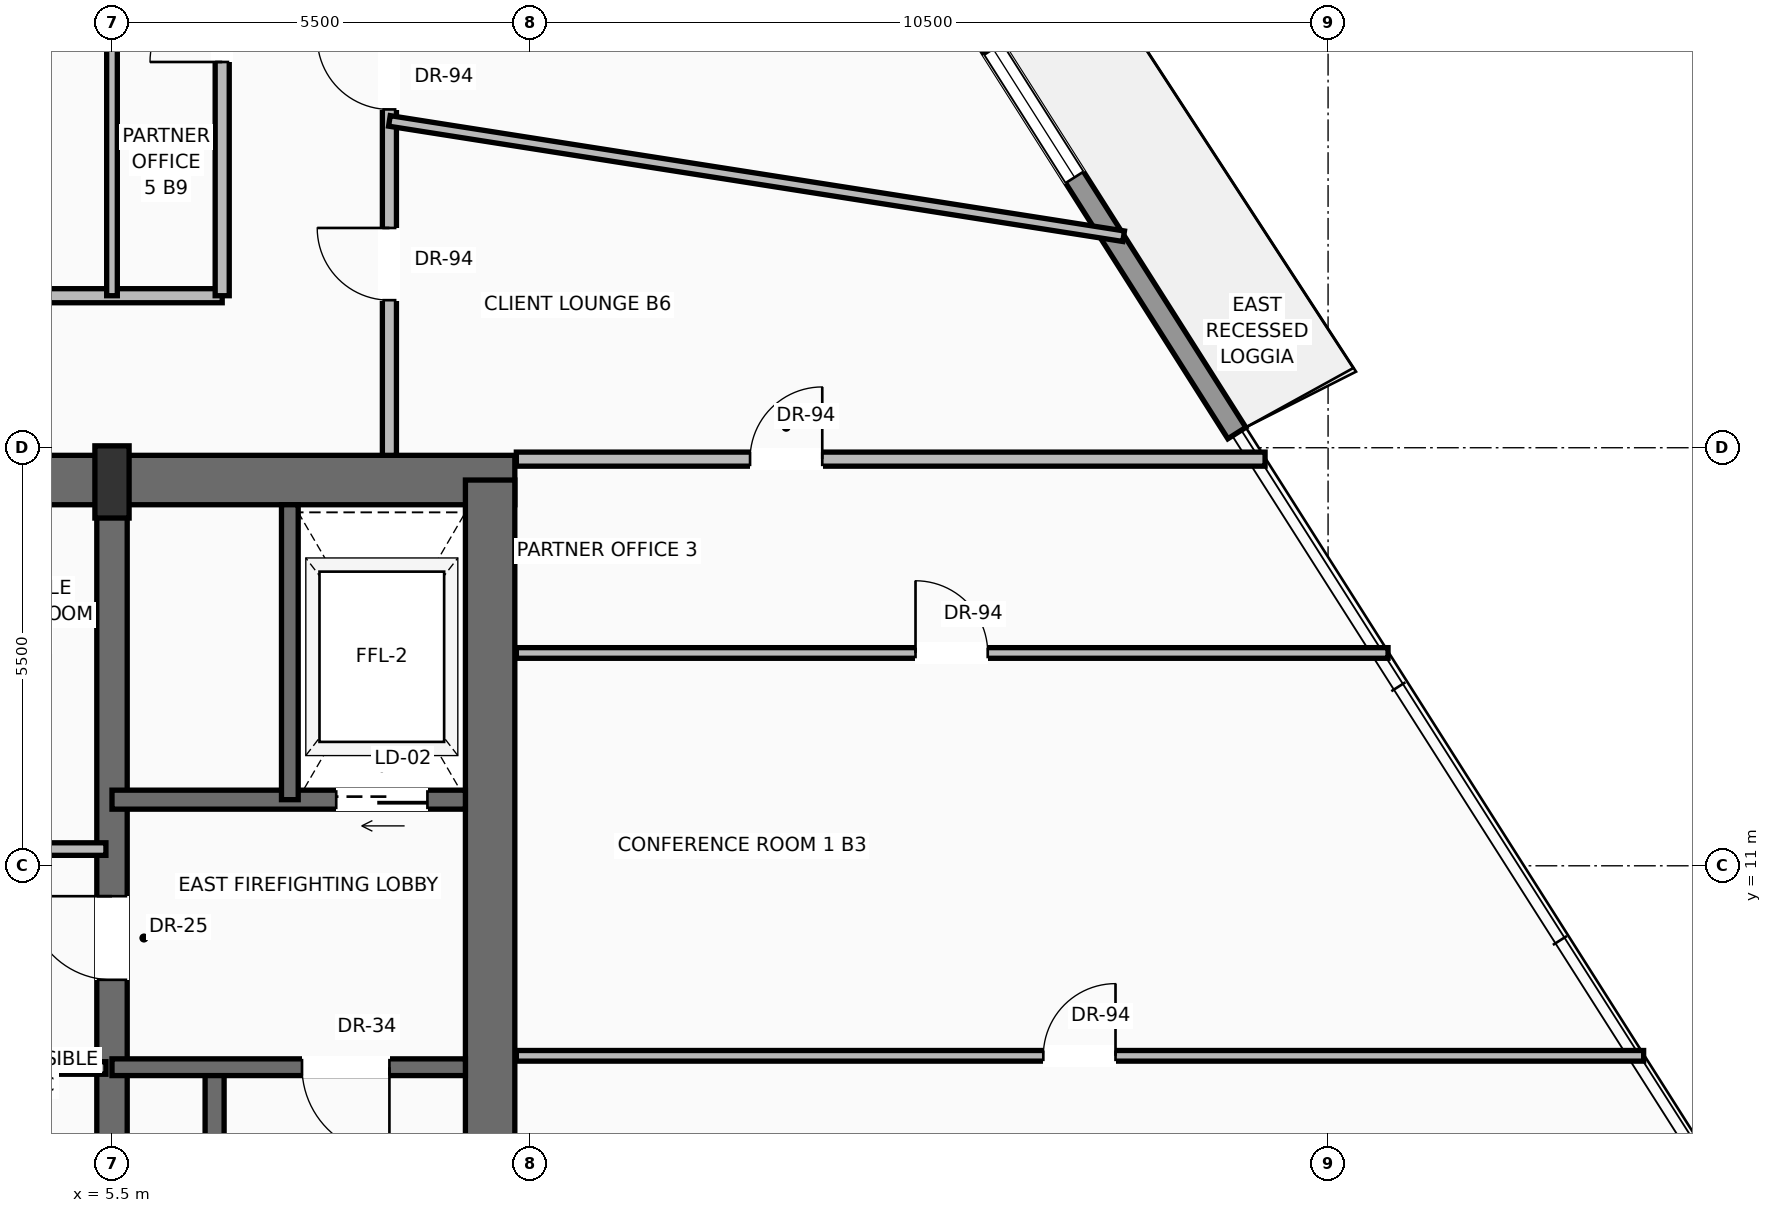
"""IFC4 building model, lengths in metres.
Left out: names, types, materials, properties, quantities, classifications, styles, units other than length and angle.
Written with IfcOpenShell. Run it as: python <this file> out.ifc"""

import sys

from ifc_helpers import new_model, si_unit, direction, frame, frame_2d, origin, origin_2d, place, context, subcontext, project, spatial, rectangle, extrude, source, transform, mapped, element, fill, save


model = new_model("IFC4")
c1 = context("Model", 3, precision=1e-05, world=origin(), true_north=direction((0.0, 1.0)))
c2 = subcontext(c1, "Body", "Model", "MODEL_VIEW")
j1 = project(units=[si_unit("LENGTHUNIT", "METRE"), si_unit("PLANEANGLEUNIT", "RADIAN")], contexts=[c1])
p1 = place(None, origin())
s1 = spatial("IfcSite", under=j1, at=p1, CompositionType="ELEMENT")
p2 = place(p1, origin())
s2 = spatial("IfcBuilding", under=s1, at=p2, CompositionType="ELEMENT")
p3 = place(p2, frame((0.0, 0.0, 174.7)))
s3 = spatial("IfcBuildingStorey", under=s2, at=p3, CompositionType="ELEMENT", Elevation=174.7)
p4 = place(p3, frame((-10.8, 16.075, 0.0), z_axis=(0.0, 0.0, 1.0), x_axis=(1.0, 0.0, 0.0)))
e1 = element("IfcWall", 1, at=p4, inside=s3, PredefinedType="SHEAR", context=c2, shape_type="SweptSolid", body=[
    extrude(rectangle(XDim=21.6, YDim=0.65, at=frame_2d((10.8, 0.0))), origin(), (0.0, 0.0, 1.0), 3.47),
])
p5 = place(p4, frame((3.37, 0.0, 0.0)))
e2 = element("IfcOpeningElement", 2, at=p5, cuts=e1, PredefinedType="OPENING", context=c2, shape_type="SweptSolid", body=[
    extrude(rectangle(XDim=1.3, YDim=2.3, at=frame_2d((0.65, 1.15))), frame((0.0, 0.335, 0.0), z_axis=(0.0, -1.0, 0.0), x_axis=(1.0, 0.0, 0.0)), (0.0, 0.0, 1.0), 0.67),
])
p6 = place(p4, frame((9.8, 0.0, 0.0)))
e3 = element("IfcOpeningElement", 3, at=p6, cuts=e1, PredefinedType="OPENING", context=c2, shape_type="SweptSolid", body=[
    extrude(rectangle(XDim=2.0, YDim=2.4, at=frame_2d((1.0, 1.2))), frame((0.0, 0.335, 0.0), z_axis=(0.0, -1.0, 0.0), x_axis=(1.0, 0.0, 0.0)), (0.0, 0.0, 1.0), 0.67),
])
p7 = place(p3, frame((10.475, 0.525, 0.0), z_axis=(0.0, 0.0, 1.0), x_axis=(0.0, 1.0, 0.0)))
e4 = element("IfcWall", 4, at=p7, inside=s3, PredefinedType="SHEAR", context=c2, shape_type="SweptSolid", body=[
    extrude(rectangle(XDim=15.55, YDim=0.65, at=frame_2d((7.775, 0.0))), origin(), (0.0, 0.0, 1.0), 3.47),
])
p8 = place(p3, frame((5.5, 0.525, 0.0), z_axis=(0.0, 0.0, 1.0), x_axis=(0.0, 1.0, 0.0)))
e5 = element("IfcWall", 5, at=p8, inside=s3, PredefinedType="SHEAR", context=c2, shape_type="SweptSolid", body=[
    extrude(rectangle(XDim=15.55, YDim=0.4, at=frame_2d((7.775, 0.0))), origin(), (0.0, 0.0, 1.0), 3.47),
])
p9 = place(p8, frame((8.975, 0.0, 0.0)))
e6 = element("IfcOpeningElement", 6, at=p9, cuts=e5, PredefinedType="OPENING", context=c2, shape_type="SweptSolid", body=[
    extrude(rectangle(XDim=1.1, YDim=2.2, at=frame_2d((0.55, 1.1))), frame((0.0, 0.21, 0.0), z_axis=(0.0, -1.0, 0.0), x_axis=(1.0, 0.0, 0.0)), (0.0, 0.0, 1.0), 0.42),
])
m1 = source(origin(), c2, "Body", "SweptSolid", [
    extrude(rectangle(XDim=0.45, YDim=0.95, at=origin_2d()), origin(), (0.0, 0.0, 1.0), 3.7),
])
p10 = place(p3, frame((5.5, 16.05, 0.0), z_axis=(0.0, 0.0, 1.0), x_axis=(1.0, 0.0, 0.0)))
e7 = element("IfcColumn", 7, at=p10, inside=s3, PredefinedType="PILASTER", context=c2, shape_type="MappedRepresentation", body=[
    mapped(m1, transform((0.0, 0.0, 0.0), scale=1.0)),
])
p11 = place(p3, frame((10.28, 32.484, 0.0), z_axis=(0.0, 0.0, 1.0), x_axis=(0.53575660665, -0.844372464278, 0.0)))
e8 = element("IfcWall", 8, at=p11, inside=s3, PredefinedType="SOLIDWALL", context=c2, shape_type="SweptSolid", body=[
    extrude(rectangle(XDim=18.701, YDim=0.28, at=frame_2d((9.351, 0.0))), origin(), (0.0, 0.0, 1.0), 3.05),
])
p12 = place(p11, frame((4.488, 0.0, 0.0)))
e9 = element("IfcOpeningElement", 9, at=p12, cuts=e8, PredefinedType="OPENING", context=c2, shape_type="SweptSolid", body=[
    extrude(rectangle(XDim=1.6, YDim=2.35, at=frame_2d((0.8, 1.175))), frame((0.0, 0.15, 0.0), z_axis=(0.0, -1.0, 0.0), x_axis=(1.0, 0.0, 0.0)), (0.0, 0.0, 1.0), 0.3),
])
p13 = place(p11, frame((12.717, 0.0, 0.9)))
e10 = element("IfcOpeningElement", 10, at=p13, cuts=e8, PredefinedType="OPENING", context=c2, shape_type="SweptSolid", body=[
    extrude(rectangle(XDim=2.0, YDim=1.85, at=frame_2d((1.0, 0.925))), frame((0.0, 0.15, 0.0), z_axis=(0.0, -1.0, 0.0), x_axis=(1.0, 0.0, 0.0)), (0.0, 0.0, 1.0), 0.3),
])
p14 = place(p3, frame((6.85, 0.85, 0.0), z_axis=(0.0, 0.0, 1.0), x_axis=(0.0, 1.0, 0.0)))
e11 = element("IfcWall", 11, at=p14, inside=s3, PredefinedType="SOLIDWALL", context=c2, shape_type="SweptSolid", body=[
    extrude(rectangle(XDim=7.5, YDim=0.25, at=frame_2d((3.75, 0.0))), origin(), (0.0, 0.0, 1.0), 3.47),
])
p15 = place(p3, frame((10.15, 8.35, 0.0), z_axis=(0.0, 0.0, 1.0), x_axis=(-1.0, 0.0, 0.0)))
e12 = element("IfcWall", 12, at=p15, inside=s3, PredefinedType="SOLIDWALL", context=c2, shape_type="SweptSolid", body=[
    extrude(rectangle(XDim=4.65, YDim=0.22, at=frame_2d((2.325, 0.0))), origin(), (0.0, 0.0, 1.0), 3.47),
])
p16 = place(p15, frame((1.0, 0.0, 0.0)))
e13 = element("IfcOpeningElement", 13, at=p16, cuts=e12, PredefinedType="OPENING", context=c2, shape_type="SweptSolid", body=[
    extrude(rectangle(XDim=1.15, YDim=2.2, at=frame_2d((0.575, 1.1))), frame((0.0, 0.12, 0.0), z_axis=(0.0, -1.0, 0.0), x_axis=(1.0, 0.0, 0.0)), (0.0, 0.0, 1.0), 0.24),
])
p17 = place(p3, frame((10.15, 11.87, 0.0), z_axis=(0.0, 0.0, 1.0), x_axis=(-1.0, 0.0, 0.0)))
e14 = element("IfcWall", 14, at=p17, inside=s3, PredefinedType="SOLIDWALL", context=c2, shape_type="SweptSolid", body=[
    extrude(rectangle(XDim=4.65, YDim=0.25, at=frame_2d((2.325, 0.0))), origin(), (0.0, 0.0, 1.0), 3.47),
])
p18 = place(p17, frame((0.5, 0.0, 0.0)))
e15 = element("IfcOpeningElement", 15, at=p18, cuts=e14, PredefinedType="OPENING", context=c2, shape_type="SweptSolid", body=[
    extrude(rectangle(XDim=1.2, YDim=2.25, at=frame_2d((0.6, 1.125))), frame((0.0, 0.135, 0.0), z_axis=(0.0, -1.0, 0.0), x_axis=(1.0, 0.0, 0.0)), (0.0, 0.0, 1.0), 0.27),
])
p19 = place(p3, frame((7.84, 11.87, 0.0), z_axis=(0.0, 0.0, 1.0), x_axis=(0.0, 1.0, 0.0)))
e16 = element("IfcWall", 16, at=p19, inside=s3, PredefinedType="SOLIDWALL", context=c2, shape_type="SweptSolid", body=[
    extrude(rectangle(XDim=3.88, YDim=0.22, at=frame_2d((1.94, 0.0))), origin(), (0.0, 0.0, 1.0), 3.47),
])
for number, where, z_axis, x_axis in (
    (17, (3.54, 8.34, 0.0), (0.0, 0.0, 1.0), (1.0, 0.0, 0.0)),
    (18, (3.54, 11.22, 0.0), (0.0, 0.0, 1.0), (1.0, 0.0, 0.0)),
):
    element("IfcWall", number, at=place(p3, frame(where, z_axis=z_axis, x_axis=x_axis)), inside=s3, PredefinedType="PARTITIONING", context=c2, shape_type="SweptSolid", body=[
        extrude(rectangle(XDim=1.88, YDim=0.165, at=frame_2d((0.94, 0.0))), origin(), (0.0, 0.0, 1.0), 3.462),
    ])
p20 = place(p3, frame((-7.25, 18.5, 0.0), z_axis=(0.0, 0.0, 1.0), x_axis=(1.0, 0.0, 0.0)))
e19 = element("IfcWall", 19, at=p20, inside=s3, PredefinedType="PARTITIONING", context=c2, shape_type="SweptSolid", body=[
    extrude(rectangle(XDim=14.2, YDim=0.185, at=frame_2d((7.1, 0.0))), origin(), (0.0, 0.0, 1.0), 2.846),
])
p21 = place(p20, frame((6.625, 0.0, 0.0)))
e20 = element("IfcOpeningElement", 20, at=p21, cuts=e19, PredefinedType="OPENING", context=c2, shape_type="SweptSolid", body=[
    extrude(rectangle(XDim=0.95, YDim=2.2, at=frame_2d((0.475, 1.1))), frame((0.0, 0.103, 0.0), z_axis=(0.0, -1.0, 0.0), x_axis=(1.0, 0.0, 0.0)), (0.0, 0.0, 1.0), 0.205),
])
p22 = place(p3, frame((6.95, 18.5, 0.0), z_axis=(0.0, 0.0, 1.0), x_axis=(0.0, 1.0, 0.0)))
e21 = element("IfcWall", 21, at=p22, inside=s3, PredefinedType="PARTITIONING", context=c2, shape_type="SweptSolid", body=[
    extrude(rectangle(XDim=7.1, YDim=0.185, at=frame_2d((3.55, 0.0))), origin(), (0.0, 0.0, 1.0), 2.846),
])
p23 = place(p22, frame((3.075, 0.0, 0.0)))
e22 = element("IfcOpeningElement", 22, at=p23, cuts=e21, PredefinedType="OPENING", context=c2, shape_type="SweptSolid", body=[
    extrude(rectangle(XDim=0.95, YDim=2.2, at=frame_2d((0.475, 1.1))), frame((0.0, 0.103, 0.0), z_axis=(0.0, -1.0, 0.0), x_axis=(1.0, 0.0, 0.0)), (0.0, 0.0, 1.0), 0.205),
])
p24 = place(p3, frame((9.15, 16.4, 0.0), z_axis=(0.0, 0.0, 1.0), x_axis=(0.0, 1.0, 0.0)))
e23 = element("IfcWall", 23, at=p24, inside=s3, PredefinedType="PARTITIONING", context=c2, shape_type="SweptSolid", body=[
    extrude(rectangle(XDim=9.2, YDim=0.185, at=frame_2d((4.6, 0.0))), origin(), (0.0, 0.0, 1.0), 2.846),
])
p25 = place(p24, frame((4.551, 0.0, 0.0)))
e24 = element("IfcOpeningElement", 24, at=p25, cuts=e23, PredefinedType="OPENING", context=c2, shape_type="SweptSolid", body=[
    extrude(rectangle(XDim=0.95, YDim=2.2, at=frame_2d((0.475, 1.1))), frame((0.0, 0.103, 0.0), z_axis=(0.0, -1.0, 0.0), x_axis=(1.0, 0.0, 0.0)), (0.0, 0.0, 1.0), 0.205),
])
p26 = place(p24, frame((2.042, 0.0, 0.0)))
e25 = element("IfcOpeningElement", 25, at=p26, cuts=e23, PredefinedType="OPENING", context=c2, shape_type="SweptSolid", body=[
    extrude(rectangle(XDim=0.95, YDim=2.2, at=frame_2d((0.475, 1.1))), frame((0.0, 0.103, 0.0), z_axis=(0.0, -1.0, 0.0), x_axis=(1.0, 0.0, 0.0)), (0.0, 0.0, 1.0), 0.205),
])
p27 = place(p3, frame((10.82, 16.35, 0.0), z_axis=(0.0, 0.0, 1.0), x_axis=(1.0, 0.0, 0.0)))
e26 = element("IfcWall", 26, at=p27, inside=s3, PredefinedType="PARTITIONING", context=c2, shape_type="SweptSolid", body=[
    extrude(rectangle(XDim=9.851, YDim=0.185, at=frame_2d((4.926, 0.0))), origin(), (0.0, 0.0, 1.0), 3.462),
])
p28 = place(p27, frame((3.075, 0.0, 0.0)))
e27 = element("IfcOpeningElement", 27, at=p28, cuts=e26, PredefinedType="OPENING", context=c2, shape_type="SweptSolid", body=[
    extrude(rectangle(XDim=0.95, YDim=2.2, at=frame_2d((0.475, 1.1))), frame((0.0, 0.103, 0.0), z_axis=(0.0, -1.0, 0.0), x_axis=(1.0, 0.0, 0.0)), (0.0, 0.0, 1.0), 0.205),
])
p29 = place(p3, frame((5.5, 18.5, 0.0), z_axis=(0.0, 0.0, 1.0), x_axis=(0.0, 1.0, 0.0)))
e28 = element("IfcWall", 28, at=p29, inside=s3, PredefinedType="PARTITIONING", context=c2, shape_type="SweptSolid", body=[
    extrude(rectangle(XDim=14.0, YDim=0.14, at=frame_2d((7.0, 0.0))), origin(), (0.0, 0.0, 1.0), 2.846),
])
p30 = place(p3, frame((10.82, 8.5, 0.0), z_axis=(0.0, 0.0, 1.0), x_axis=(1.0, 0.0, 0.0)))
e29 = element("IfcWall", 29, at=p30, inside=s3, PredefinedType="PARTITIONING", context=c2, shape_type="SweptSolid", body=[
    extrude(rectangle(XDim=14.832, YDim=0.14, at=frame_2d((7.416, 0.0))), origin(), (0.0, 0.0, 1.0), 3.462),
])
p31 = place(p30, frame((6.933, 0.0, 0.0)))
e30 = element("IfcOpeningElement", 30, at=p31, cuts=e29, PredefinedType="OPENING", context=c2, shape_type="SweptSolid", body=[
    extrude(rectangle(XDim=0.95, YDim=2.2, at=frame_2d((0.475, 1.1))), frame((0.0, 0.08, 0.0), z_axis=(0.0, -1.0, 0.0), x_axis=(1.0, 0.0, 0.0)), (0.0, 0.0, 1.0), 0.16),
])
p32 = place(p3, frame((10.82, 13.8, 0.0), z_axis=(0.0, 0.0, 1.0), x_axis=(1.0, 0.0, 0.0)))
e31 = element("IfcWall", 31, at=p32, inside=s3, PredefinedType="PARTITIONING", context=c2, shape_type="SweptSolid", body=[
    extrude(rectangle(XDim=11.469, YDim=0.14, at=frame_2d((5.734, 0.0))), origin(), (0.0, 0.0, 1.0), 3.462),
])
p33 = place(p32, frame((5.252, 0.0, 0.0)))
e32 = element("IfcOpeningElement", 32, at=p33, cuts=e31, PredefinedType="OPENING", context=c2, shape_type="SweptSolid", body=[
    extrude(rectangle(XDim=0.95, YDim=2.2, at=frame_2d((0.475, 1.1))), frame((0.0, 0.08, 0.0), z_axis=(0.0, -1.0, 0.0), x_axis=(1.0, 0.0, 0.0)), (0.0, 0.0, 1.0), 0.16),
])
p34 = place(p3, frame((9.15, 20.8, 0.0), z_axis=(0.0, 0.0, 1.0), x_axis=(0.987888554184, -0.155165087929, 0.0)))
e33 = element("IfcWall", 33, at=p34, inside=s3, PredefinedType="PARTITIONING", context=c2, shape_type="SweptSolid", body=[
    extrude(rectangle(XDim=9.779, YDim=0.14, at=frame_2d((4.889, 0.0))), origin(), (0.0, 0.0, 1.0), 3.049),
])
m2 = source(origin(), c2, "Body", "SweptSolid", [
    extrude(rectangle(XDim=2.0, YDim=1.85, at=frame_2d((1.0, 0.925))), frame((0.0, 0.03, 0.0), z_axis=(0.0, -1.0, 0.0), x_axis=(1.0, 0.0, 0.0)), (0.0, 0.0, 1.0), 0.06),
])
p35 = place(p13, origin())
e34 = element("IfcWindow", 34, at=p35, inside=s3, PartitioningType="SINGLE_PANEL", PredefinedType="WINDOW", context=c2, shape_type="MappedRepresentation", body=[
    mapped(m2, transform((0.0, 0.0, 0.0), scale=1.0)),
])
fill(e10, e34)
m3 = source(origin(), c2, "Body", "SweptSolid", [
    extrude(rectangle(XDim=1.15, YDim=2.2, at=frame_2d((0.575, 1.1))), frame((0.0, 0.025, 0.0), z_axis=(0.0, -1.0, 0.0), x_axis=(1.0, 0.0, 0.0)), (0.0, 0.0, 1.0), 0.05),
])
p36 = place(p16, origin())
e35 = element("IfcDoor", 35, at=p36, inside=s3, OperationType="SINGLE_SWING_LEFT", PredefinedType="DOOR", context=c2, shape_type="MappedRepresentation", body=[
    mapped(m3, transform((0.0, 0.0, 0.0), scale=1.0)),
])
fill(e13, e35)
m4 = source(origin(), c2, "Body", "SweptSolid", [
    extrude(rectangle(XDim=1.1, YDim=2.2, at=frame_2d((0.55, 1.1))), frame((0.0, 0.025, 0.0), z_axis=(0.0, -1.0, 0.0), x_axis=(1.0, 0.0, 0.0)), (0.0, 0.0, 1.0), 0.05),
])
p37 = place(p9, origin())
e36 = element("IfcDoor", 36, at=p37, inside=s3, OperationType="SINGLE_SWING_RIGHT", PredefinedType="DOOR", context=c2, shape_type="MappedRepresentation", body=[
    mapped(m4, transform((0.0, 0.0, 0.0), scale=1.0)),
])
fill(e6, e36)
m5 = source(origin(), c2, "Body", "SweptSolid", [
    extrude(rectangle(XDim=1.2, YDim=2.25, at=frame_2d((0.6, 1.125))), frame((0.0, 0.025, 0.0), z_axis=(0.0, -1.0, 0.0), x_axis=(1.0, 0.0, 0.0)), (0.0, 0.0, 1.0), 0.05),
])
p38 = place(p18, origin())
e37 = element("IfcDoor", 37, at=p38, inside=s3, OperationType="SLIDING_TO_RIGHT", PredefinedType="DOOR", context=c2, shape_type="MappedRepresentation", body=[
    mapped(m5, transform((0.0, 0.0, 0.0), scale=1.0)),
])
fill(e15, e37)
m6 = source(origin(), c2, "Body", "SweptSolid", [
    extrude(rectangle(XDim=0.95, YDim=2.2, at=frame_2d((0.475, 1.1))), frame((0.0, 0.025, 0.0), z_axis=(0.0, -1.0, 0.0), x_axis=(1.0, 0.0, 0.0)), (0.0, 0.0, 1.0), 0.05),
])
p39 = place(p25, origin())
e38 = element("IfcDoor", 38, at=p39, inside=s3, OperationType="SINGLE_SWING_RIGHT", PredefinedType="DOOR", context=c2, shape_type="MappedRepresentation", body=[
    mapped(m6, transform((0.0, 0.0, 0.0), scale=1.0)),
])
fill(e24, e38)
p40 = place(p28, origin())
e39 = element("IfcDoor", 39, at=p40, inside=s3, OperationType="SINGLE_SWING_RIGHT", PredefinedType="DOOR", context=c2, shape_type="MappedRepresentation", body=[
    mapped(m6, transform((0.0, 0.0, 0.0), scale=1.0)),
])
fill(e27, e39)
p41 = place(p26, origin())
e40 = element("IfcDoor", 40, at=p41, inside=s3, OperationType="SINGLE_SWING_RIGHT", PredefinedType="DOOR", context=c2, shape_type="MappedRepresentation", body=[
    mapped(m6, transform((0.0, 0.0, 0.0), scale=1.0)),
])
fill(e25, e40)
p42 = place(p23, origin())
e41 = element("IfcDoor", 41, at=p42, inside=s3, OperationType="SINGLE_SWING_LEFT", PredefinedType="DOOR", context=c2, shape_type="MappedRepresentation", body=[
    mapped(m6, transform((0.0, 0.0, 0.0), scale=1.0)),
])
fill(e22, e41)
p43 = place(p33, origin())
e42 = element("IfcDoor", 42, at=p43, inside=s3, OperationType="SINGLE_SWING_LEFT", PredefinedType="DOOR", context=c2, shape_type="MappedRepresentation", body=[
    mapped(m6, transform((0.0, 0.0, 0.0), scale=1.0)),
])
fill(e32, e42)
p44 = place(p31, origin())
e43 = element("IfcDoor", 43, at=p44, inside=s3, OperationType="SINGLE_SWING_RIGHT", PredefinedType="DOOR", context=c2, shape_type="MappedRepresentation", body=[
    mapped(m6, transform((0.0, 0.0, 0.0), scale=1.0)),
])
fill(e30, e43)
save(model, sys.argv[1])
